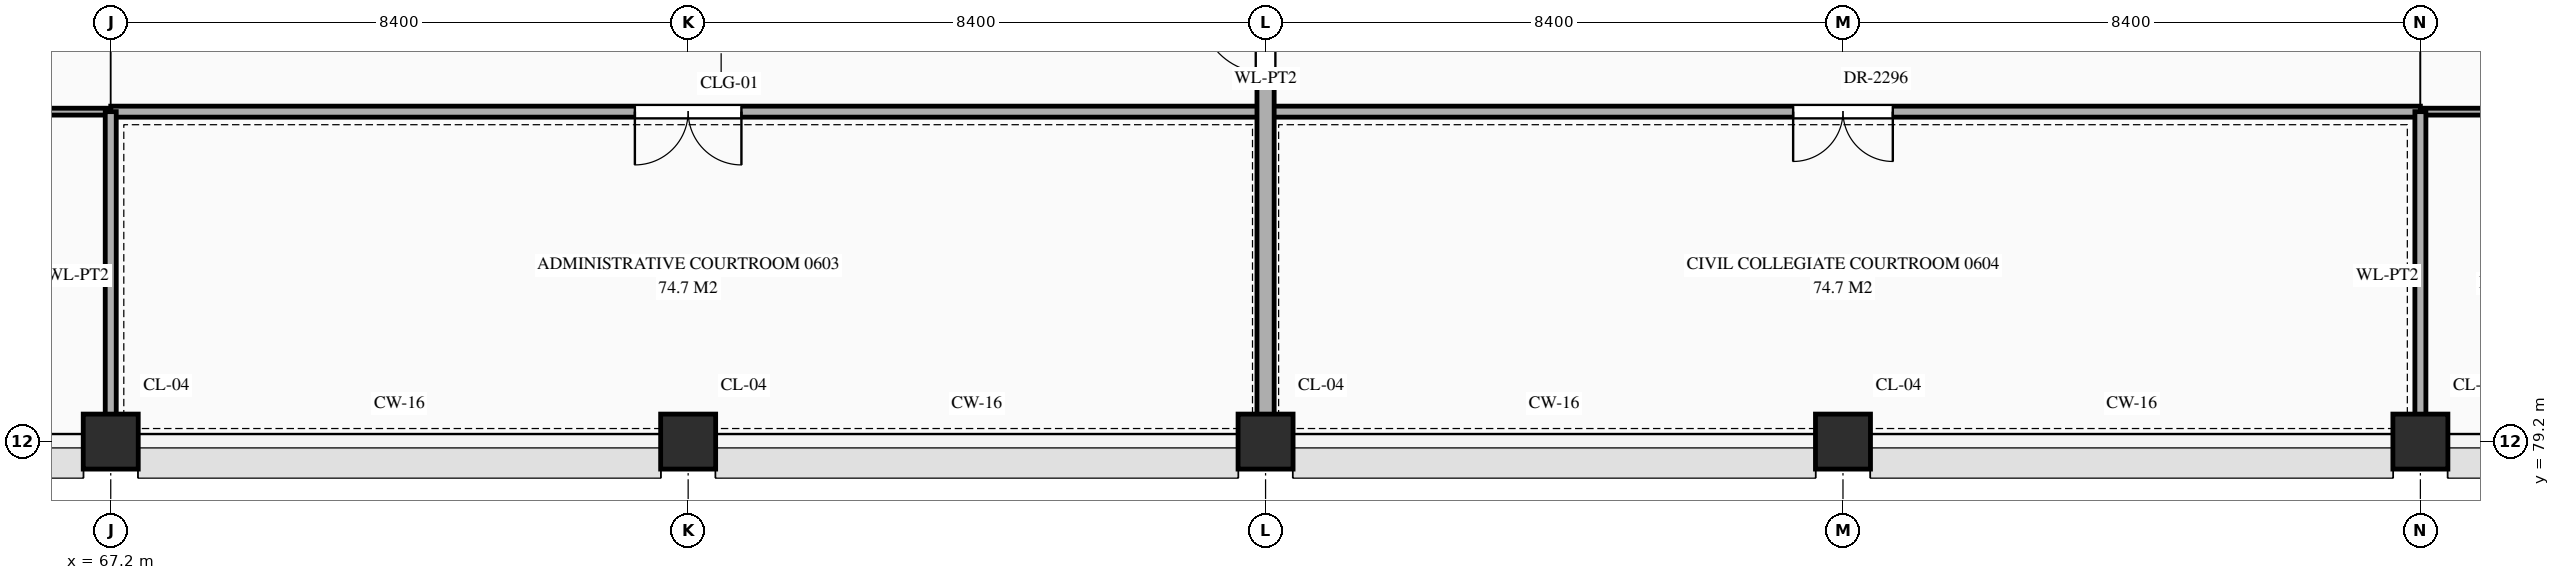
"""IFC4 building model, lengths in metres.
Left out: names, types, materials, properties, quantities, classifications, styles, units other than length and angle.
Written with IfcOpenShell. Run it as: python <this file> out.ifc"""

import sys

from ifc_helpers import new_model, si_unit, direction, frame, frame_2d, origin, origin_2d, place, context, subcontext, project, spatial, rectangle, extrude, element, fill, save


model = new_model("IFC4")
c1 = context("Model", 3, precision=1e-05, world=origin(), true_north=direction((0.0, 1.0)))
c2 = subcontext(c1, "Body", "Model", "MODEL_VIEW")
j1 = project(units=[si_unit("LENGTHUNIT", "METRE"), si_unit("PLANEANGLEUNIT", "RADIAN")], contexts=[c1])
p1 = place(None, origin())
s1 = spatial("IfcSite", under=j1, at=p1, CompositionType="ELEMENT")
p2 = place(p1, origin())
s2 = spatial("IfcBuilding", under=s1, at=p2, CompositionType="ELEMENT")
p3 = place(p2, frame((0.0, 0.0, 26.1)))
s3 = spatial("IfcBuildingStorey", under=s2, at=p3, CompositionType="ELEMENT", Elevation=26.1)
for number, where, z_axis, x_axis in (
    (1, (67.2, 79.2, 0.0), (0.0, 0.0, 1.0), (1.0, 0.0, 0.0)),
    (2, (75.6, 79.2, 0.0), (0.0, 0.0, 1.0), (1.0, 0.0, 0.0)),
    (3, (84.0, 79.2, 0.0), (0.0, 0.0, 1.0), (1.0, 0.0, 0.0)),
    (4, (92.4, 79.2, 0.0), (0.0, 0.0, 1.0), (1.0, 0.0, 0.0)),
    (5, (100.8, 79.2, 0.0), (0.0, 0.0, 1.0), (1.0, 0.0, 0.0)),
):
    element("IfcColumn", number, at=place(p3, frame(where, z_axis=z_axis, x_axis=x_axis)), inside=s3, PredefinedType="COLUMN", context=c2, shape_type="SweptSolid", body=[
        extrude(rectangle(XDim=0.8, YDim=0.8, at=origin_2d()), origin(), (0.0, 0.0, 1.0), 4.5),
    ])
p4 = place(p3, frame((50.4, 84.0, 0.0), z_axis=(0.0, 0.0, 1.0), x_axis=(1.0, 0.0, 0.0)))
e6 = element("IfcWall", 6, at=p4, inside=s3, PredefinedType="STANDARD", context=c2, shape_type="SweptSolid", body=[
    extrude(rectangle(XDim=16.8, YDim=0.1, at=frame_2d((8.4, 0.0))), origin(), (0.0, 0.0, 1.0), 4.24),
])
p5 = place(p4, frame((3.72, 0.0, 0.0)))
e7 = element("IfcOpeningElement", 7, at=p5, cuts=e6, PredefinedType="OPENING", context=c2, shape_type="SweptSolid", body=[
    extrude(rectangle(XDim=0.96, YDim=2.2, at=frame_2d((0.48, 1.1))), frame((0.0, 0.062, 0.0), z_axis=(0.0, -1.0, 0.0), x_axis=(1.0, 0.0, 0.0)), (0.0, 0.0, 1.0), 0.124),
])
p6 = place(p4, frame((12.1, 0.0, 0.0)))
e8 = element("IfcOpeningElement", 8, at=p6, cuts=e6, PredefinedType="OPENING", context=c2, shape_type="SweptSolid", body=[
    extrude(rectangle(XDim=1.0, YDim=2.25, at=frame_2d((0.5, 1.125))), frame((0.0, 0.062, 0.0), z_axis=(0.0, -1.0, 0.0), x_axis=(1.0, 0.0, 0.0)), (0.0, 0.0, 1.0), 0.124),
])
p7 = place(p3, frame((67.2, 84.0, 0.0), z_axis=(0.0, 0.0, 1.0), x_axis=(1.0, 0.0, 0.0)))
e9 = element("IfcWall", 9, at=p7, inside=s3, PredefinedType="STANDARD", context=c2, shape_type="SweptSolid", body=[
    extrude(rectangle(XDim=33.6, YDim=0.16, at=frame_2d((16.8, 0.0))), origin(), (0.0, 0.0, 1.0), 4.24),
])
p8 = place(p7, frame((7.625, 0.0, 0.0)))
e10 = element("IfcOpeningElement", 10, at=p8, cuts=e9, PredefinedType="OPENING", context=c2, shape_type="SweptSolid", body=[
    extrude(rectangle(XDim=1.55, YDim=2.35, at=frame_2d((0.775, 1.175))), frame((0.0, 0.092, 0.0), z_axis=(0.0, -1.0, 0.0), x_axis=(1.0, 0.0, 0.0)), (0.0, 0.0, 1.0), 0.184),
])
p9 = place(p7, frame((24.475, 0.0, 0.0)))
e11 = element("IfcOpeningElement", 11, at=p9, cuts=e9, PredefinedType="OPENING", context=c2, shape_type="SweptSolid", body=[
    extrude(rectangle(XDim=1.45, YDim=2.3, at=frame_2d((0.725, 1.15))), frame((0.0, 0.092, 0.0), z_axis=(0.0, -1.0, 0.0), x_axis=(1.0, 0.0, 0.0)), (0.0, 0.0, 1.0), 0.184),
])
p10 = place(p3, frame((100.8, 84.0, 0.0), z_axis=(0.0, 0.0, 1.0), x_axis=(1.0, 0.0, 0.0)))
e12 = element("IfcWall", 12, at=p10, inside=s3, PredefinedType="STANDARD", context=c2, shape_type="SweptSolid", body=[
    extrude(rectangle(XDim=16.8, YDim=0.1, at=frame_2d((8.4, 0.0))), origin(), (0.0, 0.0, 1.0), 4.24),
])
p11 = place(p10, frame((3.62, 0.0, 0.0)))
e13 = element("IfcOpeningElement", 13, at=p11, cuts=e12, PredefinedType="OPENING", context=c2, shape_type="SweptSolid", body=[
    extrude(rectangle(XDim=1.16, YDim=2.3, at=frame_2d((0.58, 1.15))), frame((0.0, 0.062, 0.0), z_axis=(0.0, -1.0, 0.0), x_axis=(1.0, 0.0, 0.0)), (0.0, 0.0, 1.0), 0.124),
])
p12 = place(p10, frame((12.0, 0.0, 0.0)))
e14 = element("IfcOpeningElement", 14, at=p12, cuts=e12, PredefinedType="OPENING", context=c2, shape_type="SweptSolid", body=[
    extrude(rectangle(XDim=1.2, YDim=2.35, at=frame_2d((0.6, 1.175))), frame((0.0, 0.062, 0.0), z_axis=(0.0, -1.0, 0.0), x_axis=(1.0, 0.0, 0.0)), (0.0, 0.0, 1.0), 0.124),
])
p13 = place(p3, frame((67.2, 79.24, 0.0), z_axis=(0.0, 0.0, 1.0), x_axis=(0.0, 1.0, 0.0)))
e15 = element("IfcWall", 15, at=p13, inside=s3, PredefinedType="STANDARD", context=c2, shape_type="SweptSolid", body=[
    extrude(rectangle(XDim=4.76, YDim=0.16, at=frame_2d((2.38, 0.0))), origin(), (0.0, 0.0, 1.0), 3.49),
])
p14 = place(p3, frame((84.0, 79.24, 0.0), z_axis=(0.0, 0.0, 1.0), x_axis=(0.0, 1.0, 0.0)))
e16 = element("IfcWall", 16, at=p14, inside=s3, PredefinedType="STANDARD", context=c2, shape_type="SweptSolid", body=[
    extrude(rectangle(XDim=35.92, YDim=0.25, at=frame_2d((17.96, 0.0))), origin(), (0.0, 0.0, 1.0), 3.49),
])
p15 = place(p14, frame((22.62, 0.0, 0.0)))
e17 = element("IfcOpeningElement", 17, at=p15, cuts=e16, PredefinedType="OPENING", context=c2, shape_type="SweptSolid", body=[
    extrude(rectangle(XDim=1.8, YDim=2.35, at=frame_2d((0.9, 1.175))), frame((0.0, 0.137, 0.0), z_axis=(0.0, -1.0, 0.0), x_axis=(1.0, 0.0, 0.0)), (0.0, 0.0, 1.0), 0.274),
])
p16 = place(p14, frame((12.5, 0.0, 0.0)))
e18 = element("IfcOpeningElement", 18, at=p16, cuts=e16, PredefinedType="OPENING", context=c2, shape_type="SweptSolid", body=[
    extrude(rectangle(XDim=1.0, YDim=2.2, at=frame_2d((0.5, 1.1))), frame((0.0, 0.137, 0.0), z_axis=(0.0, -1.0, 0.0), x_axis=(1.0, 0.0, 0.0)), (0.0, 0.0, 1.0), 0.274),
])
p17 = place(p14, frame((15.17, 0.0, 0.0)))
e19 = element("IfcOpeningElement", 19, at=p17, cuts=e16, PredefinedType="OPENING", context=c2, shape_type="SweptSolid", body=[
    extrude(rectangle(XDim=1.1, YDim=2.2, at=frame_2d((0.55, 1.1))), frame((0.0, 0.137, 0.0), z_axis=(0.0, -1.0, 0.0), x_axis=(1.0, 0.0, 0.0)), (0.0, 0.0, 1.0), 0.274),
])
p18 = place(p14, frame((26.05, 0.0, 0.0)))
e20 = element("IfcOpeningElement", 20, at=p18, cuts=e16, PredefinedType="OPENING", context=c2, shape_type="SweptSolid", body=[
    extrude(rectangle(XDim=1.5, YDim=2.25, at=frame_2d((0.75, 1.125))), frame((0.0, 0.137, 0.0), z_axis=(0.0, -1.0, 0.0), x_axis=(1.0, 0.0, 0.0)), (0.0, 0.0, 1.0), 0.274),
])
p19 = place(p14, frame((29.645, 0.0, 0.0)))
e21 = element("IfcOpeningElement", 21, at=p19, cuts=e16, PredefinedType="OPENING", context=c2, shape_type="SweptSolid", body=[
    extrude(rectangle(XDim=0.95, YDim=2.15, at=frame_2d((0.475, 1.075))), frame((0.0, 0.137, 0.0), z_axis=(0.0, -1.0, 0.0), x_axis=(1.0, 0.0, 0.0)), (0.0, 0.0, 1.0), 0.274),
])
p20 = place(p14, frame((5.325, 0.0, 0.0)))
e22 = element("IfcOpeningElement", 22, at=p20, cuts=e16, PredefinedType="OPENING", context=c2, shape_type="SweptSolid", body=[
    extrude(rectangle(XDim=0.95, YDim=2.15, at=frame_2d((0.475, 1.075))), frame((0.0, 0.137, 0.0), z_axis=(0.0, -1.0, 0.0), x_axis=(1.0, 0.0, 0.0)), (0.0, 0.0, 1.0), 0.274),
])
p21 = place(p3, frame((100.8, 79.24, 0.0), z_axis=(0.0, 0.0, 1.0), x_axis=(0.0, 1.0, 0.0)))
e23 = element("IfcWall", 23, at=p21, inside=s3, PredefinedType="STANDARD", context=c2, shape_type="SweptSolid", body=[
    extrude(rectangle(XDim=4.76, YDim=0.16, at=frame_2d((2.38, 0.0))), origin(), (0.0, 0.0, 1.0), 3.49),
])
p22 = place(p20, origin())
e24 = element("IfcDoor", 24, at=p22, inside=s3, OperationType="SINGLE_SWING_RIGHT", PredefinedType="DOOR", context=c2, shape_type="SweptSolid", body=[
    extrude(rectangle(XDim=0.95, YDim=2.15, at=frame_2d((0.475, 1.075))), frame((0.0, 0.025, 0.0), z_axis=(0.0, -1.0, 0.0), x_axis=(1.0, 0.0, 0.0)), (0.0, 0.0, 1.0), 0.05),
])
fill(e22, e24)
p23 = place(p8, frame((1.55, 0.0, 0.0), z_axis=(0.0, 0.0, 1.0), x_axis=(-1.0, 0.0, 0.0)))
e25 = element("IfcDoor", 25, at=p23, inside=s3, OperationType="DOUBLE_DOOR_SINGLE_SWING", PredefinedType="DOOR", context=c2, shape_type="SweptSolid", body=[
    extrude(rectangle(XDim=1.55, YDim=2.35, at=frame_2d((0.775, 1.175))), frame((0.0, 0.025, 0.0), z_axis=(0.0, -1.0, 0.0), x_axis=(1.0, 0.0, 0.0)), (0.0, 0.0, 1.0), 0.05),
])
fill(e10, e25)
p24 = place(p9, frame((1.45, 0.0, 0.0), z_axis=(0.0, 0.0, 1.0), x_axis=(-1.0, 0.0, 0.0)))
e26 = element("IfcDoor", 26, at=p24, inside=s3, OperationType="DOUBLE_DOOR_SINGLE_SWING", PredefinedType="DOOR", context=c2, shape_type="SweptSolid", body=[
    extrude(rectangle(XDim=1.45, YDim=2.3, at=frame_2d((0.725, 1.15))), frame((0.0, 0.025, 0.0), z_axis=(0.0, -1.0, 0.0), x_axis=(1.0, 0.0, 0.0)), (0.0, 0.0, 1.0), 0.05),
])
fill(e11, e26)
save(model, sys.argv[1])
